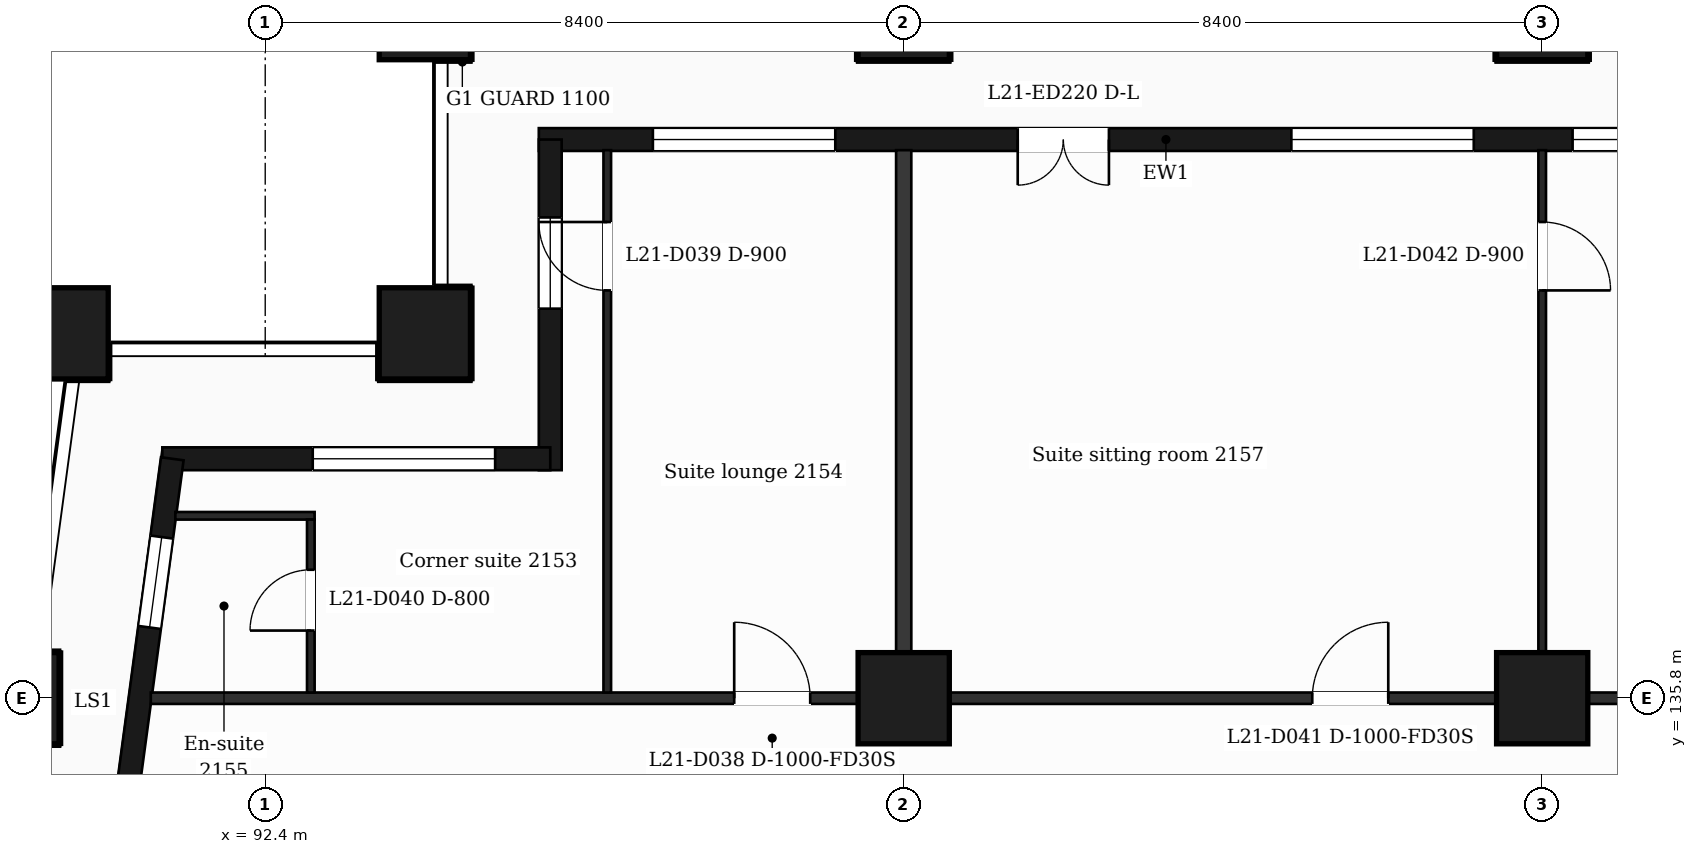
"""IFC4 building model, lengths in metres.
Left out: names, types, materials, properties, quantities, classifications, styles, units other than length and angle.
Written with IfcOpenShell. Run it as: python <this file> out.ifc"""

import sys

from ifc_helpers import new_model, si_unit, direction, frame, frame_2d, origin, origin_2d, place, context, subcontext, project, spatial, rectangle, extrude, element, fill, save


model = new_model("IFC4")
c1 = context("Model", 3, precision=1e-05, world=origin(), true_north=direction((0.0, 1.0)))
c2 = subcontext(c1, "Body", "Model", "MODEL_VIEW")
j1 = project(units=[si_unit("LENGTHUNIT", "METRE"), si_unit("PLANEANGLEUNIT", "RADIAN")], contexts=[c1])
p1 = place(None, origin())
s1 = spatial("IfcSite", under=j1, at=p1, CompositionType="ELEMENT")
p2 = place(p1, origin())
s2 = spatial("IfcBuilding", under=s1, at=p2, CompositionType="ELEMENT")
p3 = place(p2, frame((0.0, 0.0, 94.7)))
s3 = spatial("IfcBuildingStorey", under=s2, at=p3, CompositionType="ELEMENT", Elevation=94.7)
for number, where, z_axis, x_axis in (
    (1, (94.5, 140.6, 0.0), (0.0, 0.0, 1.0), (1.0, 0.0, 0.0)),
    (2, (89.735, 140.6, 0.0), (0.0, 0.0, 1.0), (1.0, 0.0, 0.0)),
    (3, (100.8, 135.8, 0.0), (0.0, 0.0, 1.0), (1.0, 0.0, 0.0)),
    (4, (109.2, 135.8, 0.0), (0.0, 0.0, 1.0), (1.0, 0.0, 0.0)),
    (5, (89.088, 135.8, 0.0), (0.0, 0.0, 1.0), (1.0, 0.0, 0.0)),
    (6, (100.8, 144.8, 0.0), (0.0, 0.0, 1.0), (1.0, 0.0, 0.0)),
    (7, (109.2, 144.8, 0.0), (0.0, 0.0, 1.0), (1.0, 0.0, 0.0)),
    (8, (94.5, 144.8, 0.0), (0.0, 0.0, 1.0), (1.0, 0.0, 0.0)),
):
    element("IfcColumn", number, at=place(p3, frame(where, z_axis=z_axis, x_axis=x_axis)), inside=s3, PredefinedType="COLUMN", context=c2, shape_type="SweptSolid", body=[
        extrude(rectangle(XDim=1.2, YDim=1.2, at=origin_2d()), origin(), (0.0, 0.0, 1.0), 3.7),
    ])
p4 = place(p3, frame((112.5, 143.15, 0.0), z_axis=(0.0, 0.0, 1.0), x_axis=(-1.0, 0.0, 0.0)))
e9 = element("IfcWall", 9, at=p4, inside=s3, PredefinedType="SOLIDWALL", context=c2, shape_type="SweptSolid", body=[
    extrude(rectangle(XDim=16.5, YDim=0.3, at=frame_2d((8.25, 0.0))), origin(), (0.0, 0.0, 1.0), 3.38),
])
p5 = place(p4, frame((0.5, 0.0, 0.9)))
e10 = element("IfcOpeningElement", 10, at=p5, cuts=e9, PredefinedType="OPENING", context=c2, shape_type="SweptSolid", body=[
    extrude(rectangle(XDim=2.4, YDim=2.1, at=frame_2d((1.2, 1.05))), frame((0.0, 0.16, 0.0), z_axis=(0.0, -1.0, 0.0), x_axis=(1.0, 0.0, 0.0)), (0.0, 0.0, 1.0), 0.32),
])
p6 = place(p4, frame((4.2, 0.0, 0.9)))
e11 = element("IfcOpeningElement", 11, at=p6, cuts=e9, PredefinedType="OPENING", context=c2, shape_type="SweptSolid", body=[
    extrude(rectangle(XDim=2.4, YDim=2.1, at=frame_2d((1.2, 1.05))), frame((0.0, 0.16, 0.0), z_axis=(0.0, -1.0, 0.0), x_axis=(1.0, 0.0, 0.0)), (0.0, 0.0, 1.0), 0.32),
])
p7 = place(p4, frame((9.0, 0.0, 0.0)))
e12 = element("IfcOpeningElement", 12, at=p7, cuts=e9, PredefinedType="OPENING", context=c2, shape_type="SweptSolid", body=[
    extrude(rectangle(XDim=1.2, YDim=2.4, at=frame_2d((0.6, 1.2))), frame((0.0, 0.16, 0.0), z_axis=(0.0, -1.0, 0.0), x_axis=(1.0, 0.0, 0.0)), (0.0, 0.0, 1.0), 0.32),
])
p8 = place(p4, frame((12.6, 0.0, 0.9)))
e13 = element("IfcOpeningElement", 13, at=p8, cuts=e9, PredefinedType="OPENING", context=c2, shape_type="SweptSolid", body=[
    extrude(rectangle(XDim=2.4, YDim=2.1, at=frame_2d((1.2, 1.05))), frame((0.0, 0.16, 0.0), z_axis=(0.0, -1.0, 0.0), x_axis=(1.0, 0.0, 0.0)), (0.0, 0.0, 1.0), 0.32),
])
p9 = place(p3, frame((96.15, 143.15, 0.0), z_axis=(0.0, 0.0, 1.0), x_axis=(0.0, -1.0, 0.0)))
e14 = element("IfcWall", 14, at=p9, inside=s3, PredefinedType="SOLIDWALL", context=c2, shape_type="SweptSolid", body=[
    extrude(rectangle(XDim=4.35, YDim=0.3, at=frame_2d((2.175, 0.0))), origin(), (0.0, 0.0, 1.0), 3.38),
])
p10 = place(p9, frame((1.025, 0.0, 0.9)))
e15 = element("IfcOpeningElement", 15, at=p10, cuts=e14, PredefinedType="OPENING", context=c2, shape_type="SweptSolid", body=[
    extrude(rectangle(XDim=1.2, YDim=2.1, at=frame_2d((0.6, 1.05))), frame((0.0, 0.16, 0.0), z_axis=(0.0, -1.0, 0.0), x_axis=(1.0, 0.0, 0.0)), (0.0, 0.0, 1.0), 0.32),
])
p11 = place(p3, frame((96.15, 138.95, 0.0), z_axis=(0.0, 0.0, 1.0), x_axis=(-1.0, 0.0, 0.0)))
e16 = element("IfcWall", 16, at=p11, inside=s3, PredefinedType="SOLIDWALL", context=c2, shape_type="SweptSolid", body=[
    extrude(rectangle(XDim=5.104, YDim=0.3, at=frame_2d((2.552, 0.0))), origin(), (0.0, 0.0, 1.0), 3.38),
])
p12 = place(p11, frame((0.725, 0.0, 0.9)))
e17 = element("IfcOpeningElement", 17, at=p12, cuts=e16, PredefinedType="OPENING", context=c2, shape_type="SweptSolid", body=[
    extrude(rectangle(XDim=2.4, YDim=2.1, at=frame_2d((1.2, 1.05))), frame((0.0, 0.16, 0.0), z_axis=(0.0, -1.0, 0.0), x_axis=(1.0, 0.0, 0.0)), (0.0, 0.0, 1.0), 0.32),
])
p13 = place(p3, frame((91.177, 138.95, 0.0), z_axis=(0.0, 0.0, 1.0), x_axis=(-0.133426664613, -0.991058689065, 0.0)))
e18 = element("IfcWall", 18, at=p13, inside=s3, PredefinedType="SOLIDWALL", context=c2, shape_type="SweptSolid", body=[
    extrude(rectangle(XDim=6.609, YDim=0.3, at=frame_2d((3.305, 0.0))), origin(), (0.0, 0.0, 1.0), 3.38),
])
p14 = place(p13, frame((1.039, 0.0, 0.9)))
e19 = element("IfcOpeningElement", 19, at=p14, cuts=e18, PredefinedType="OPENING", context=c2, shape_type="SweptSolid", body=[
    extrude(rectangle(XDim=1.2, YDim=2.1, at=frame_2d((0.6, 1.05))), frame((0.0, 0.16, 0.0), z_axis=(0.0, -1.0, 0.0), x_axis=(1.0, 0.0, 0.0)), (0.0, 0.0, 1.0), 0.32),
])
p15 = place(p13, frame((4.294, 0.0, 0.0)))
e20 = element("IfcOpeningElement", 20, at=p15, cuts=e18, PredefinedType="OPENING", context=c2, shape_type="SweptSolid", body=[
    extrude(rectangle(XDim=1.2, YDim=2.4, at=frame_2d((0.6, 1.2))), frame((0.0, 0.16, 0.0), z_axis=(0.0, -1.0, 0.0), x_axis=(1.0, 0.0, 0.0)), (0.0, 0.0, 1.0), 0.32),
])
p16 = place(p3, frame((90.895, 135.8, 0.0), z_axis=(0.0, 0.0, 1.0), x_axis=(1.0, 0.0, 0.0)))
e21 = element("IfcWall", 21, at=p16, inside=s3, PredefinedType="PARTITIONING", context=c2, shape_type="SweptSolid", body=[
    extrude(rectangle(XDim=45.011, YDim=0.15, at=frame_2d((22.505, 0.0))), origin(), (0.0, 0.0, 1.0), 3.38),
])
p17 = place(p16, frame((7.675, 0.0, 0.0)))
e22 = element("IfcOpeningElement", 22, at=p17, cuts=e21, PredefinedType="OPENING", context=c2, shape_type="SweptSolid", body=[
    extrude(rectangle(XDim=1.0, YDim=2.1, at=frame_2d((0.5, 1.05))), frame((0.0, 0.085, 0.0), z_axis=(0.0, -1.0, 0.0), x_axis=(1.0, 0.0, 0.0)), (0.0, 0.0, 1.0), 0.17),
])
p18 = place(p16, frame((15.281, 0.0, 0.0)))
e23 = element("IfcOpeningElement", 23, at=p18, cuts=e21, PredefinedType="OPENING", context=c2, shape_type="SweptSolid", body=[
    extrude(rectangle(XDim=1.0, YDim=2.1, at=frame_2d((0.5, 1.05))), frame((0.0, 0.085, 0.0), z_axis=(0.0, -1.0, 0.0), x_axis=(1.0, 0.0, 0.0)), (0.0, 0.0, 1.0), 0.17),
])
p19 = place(p16, frame((29.735, 0.0, 0.0)))
e24 = element("IfcOpeningElement", 24, at=p19, cuts=e21, PredefinedType="OPENING", context=c2, shape_type="SweptSolid", body=[
    extrude(rectangle(XDim=1.0, YDim=2.1, at=frame_2d((0.5, 1.05))), frame((0.0, 0.085, 0.0), z_axis=(0.0, -1.0, 0.0), x_axis=(1.0, 0.0, 0.0)), (0.0, 0.0, 1.0), 0.17),
])
p20 = place(p16, frame((36.005, 0.0, 0.0)))
e25 = element("IfcOpeningElement", 25, at=p20, cuts=e21, PredefinedType="OPENING", context=c2, shape_type="SweptSolid", body=[
    extrude(rectangle(XDim=1.0, YDim=2.1, at=frame_2d((0.5, 1.05))), frame((0.0, 0.085, 0.0), z_axis=(0.0, -1.0, 0.0), x_axis=(1.0, 0.0, 0.0)), (0.0, 0.0, 1.0), 0.17),
])
p21 = place(p3, frame((91.218, 138.2, 0.0), z_axis=(0.0, 0.0, 1.0), x_axis=(1.0, 0.0, 0.0)))
e26 = element("IfcWall", 26, at=p21, inside=s3, PredefinedType="PARTITIONING", context=c2, shape_type="SweptSolid", body=[
    extrude(rectangle(XDim=1.832, YDim=0.1, at=frame_2d((0.916, 0.0))), origin(), (0.0, 0.0, 1.0), 3.38),
])
p22 = place(p3, frame((93.0, 135.875, 0.0), z_axis=(0.0, 0.0, 1.0), x_axis=(0.0, 1.0, 0.0)))
e27 = element("IfcWall", 27, at=p22, inside=s3, PredefinedType="PARTITIONING", context=c2, shape_type="SweptSolid", body=[
    extrude(rectangle(XDim=2.275, YDim=0.1, at=frame_2d((1.137, 0.0))), origin(), (0.0, 0.0, 1.0), 3.38),
])
p23 = place(p22, frame((0.815, 0.0, 0.0)))
e28 = element("IfcOpeningElement", 28, at=p23, cuts=e27, PredefinedType="OPENING", context=c2, shape_type="SweptSolid", body=[
    extrude(rectangle(XDim=0.8, YDim=2.1, at=frame_2d((0.4, 1.05))), frame((0.0, 0.06, 0.0), z_axis=(0.0, -1.0, 0.0), x_axis=(1.0, 0.0, 0.0)), (0.0, 0.0, 1.0), 0.12),
])
p24 = place(p3, frame((96.9, 135.875, 0.0), z_axis=(0.0, 0.0, 1.0), x_axis=(0.0, 1.0, 0.0)))
e29 = element("IfcWall", 29, at=p24, inside=s3, PredefinedType="PARTITIONING", context=c2, shape_type="SweptSolid", body=[
    extrude(rectangle(XDim=7.135, YDim=0.1, at=frame_2d((3.567, 0.0))), origin(), (0.0, 0.0, 1.0), 3.38),
])
p25 = place(p24, frame((5.29, 0.0, 0.0)))
e30 = element("IfcOpeningElement", 30, at=p25, cuts=e29, PredefinedType="OPENING", context=c2, shape_type="SweptSolid", body=[
    extrude(rectangle(XDim=0.9, YDim=2.1, at=frame_2d((0.45, 1.05))), frame((0.0, 0.06, 0.0), z_axis=(0.0, -1.0, 0.0), x_axis=(1.0, 0.0, 0.0)), (0.0, 0.0, 1.0), 0.12),
])
p26 = place(p3, frame((100.8, 135.875, 0.0), z_axis=(0.0, 0.0, 1.0), x_axis=(0.0, 1.0, 0.0)))
e31 = element("IfcWall", 31, at=p26, inside=s3, PredefinedType="PARTITIONING", context=c2, shape_type="SweptSolid", body=[
    extrude(rectangle(XDim=7.135, YDim=0.2, at=frame_2d((3.567, 0.0))), origin(), (0.0, 0.0, 1.0), 3.38),
])
p27 = place(p3, frame((109.2, 135.875, 0.0), z_axis=(0.0, 0.0, 1.0), x_axis=(0.0, 1.0, 0.0)))
e32 = element("IfcWall", 32, at=p27, inside=s3, PredefinedType="PARTITIONING", context=c2, shape_type="SweptSolid", body=[
    extrude(rectangle(XDim=7.135, YDim=0.1, at=frame_2d((3.567, 0.0))), origin(), (0.0, 0.0, 1.0), 3.38),
])
p28 = place(p27, frame((5.29, 0.0, 0.0)))
e33 = element("IfcOpeningElement", 33, at=p28, cuts=e32, PredefinedType="OPENING", context=c2, shape_type="SweptSolid", body=[
    extrude(rectangle(XDim=0.9, YDim=2.1, at=frame_2d((0.45, 1.05))), frame((0.0, 0.06, 0.0), z_axis=(0.0, -1.0, 0.0), x_axis=(1.0, 0.0, 0.0)), (0.0, 0.0, 1.0), 0.12),
])
p29 = place(p5, origin())
e34 = element("IfcWindow", 34, at=p29, inside=s3, PartitioningType="SINGLE_PANEL", PredefinedType="WINDOW", context=c2, shape_type="SweptSolid", body=[
    extrude(rectangle(XDim=2.4, YDim=2.1, at=frame_2d((1.2, 1.05))), frame((0.0, 0.03, 0.0), z_axis=(0.0, -1.0, 0.0), x_axis=(1.0, 0.0, 0.0)), (0.0, 0.0, 1.0), 0.06),
])
fill(e10, e34)
p30 = place(p6, origin())
e35 = element("IfcWindow", 35, at=p30, inside=s3, PartitioningType="SINGLE_PANEL", PredefinedType="WINDOW", context=c2, shape_type="SweptSolid", body=[
    extrude(rectangle(XDim=2.4, YDim=2.1, at=frame_2d((1.2, 1.05))), frame((0.0, 0.03, 0.0), z_axis=(0.0, -1.0, 0.0), x_axis=(1.0, 0.0, 0.0)), (0.0, 0.0, 1.0), 0.06),
])
fill(e11, e35)
p31 = place(p7, origin())
e36 = element("IfcDoor", 36, at=p31, inside=s3, OperationType="DOUBLE_DOOR_SINGLE_SWING", PredefinedType="DOOR", context=c2, shape_type="SweptSolid", body=[
    extrude(rectangle(XDim=1.2, YDim=2.4, at=frame_2d((0.6, 1.2))), frame((0.0, 0.025, 0.0), z_axis=(0.0, -1.0, 0.0), x_axis=(1.0, 0.0, 0.0)), (0.0, 0.0, 1.0), 0.05),
])
fill(e12, e36)
p32 = place(p8, origin())
e37 = element("IfcWindow", 37, at=p32, inside=s3, PartitioningType="SINGLE_PANEL", PredefinedType="WINDOW", context=c2, shape_type="SweptSolid", body=[
    extrude(rectangle(XDim=2.4, YDim=2.1, at=frame_2d((1.2, 1.05))), frame((0.0, 0.03, 0.0), z_axis=(0.0, -1.0, 0.0), x_axis=(1.0, 0.0, 0.0)), (0.0, 0.0, 1.0), 0.06),
])
fill(e13, e37)
p33 = place(p10, origin())
e38 = element("IfcWindow", 38, at=p33, inside=s3, PartitioningType="SINGLE_PANEL", PredefinedType="WINDOW", context=c2, shape_type="SweptSolid", body=[
    extrude(rectangle(XDim=1.2, YDim=2.1, at=frame_2d((0.6, 1.05))), frame((0.0, 0.03, 0.0), z_axis=(0.0, -1.0, 0.0), x_axis=(1.0, 0.0, 0.0)), (0.0, 0.0, 1.0), 0.06),
])
fill(e15, e38)
p34 = place(p12, origin())
e39 = element("IfcWindow", 39, at=p34, inside=s3, PartitioningType="SINGLE_PANEL", PredefinedType="WINDOW", context=c2, shape_type="SweptSolid", body=[
    extrude(rectangle(XDim=2.4, YDim=2.1, at=frame_2d((1.2, 1.05))), frame((0.0, 0.03, 0.0), z_axis=(0.0, -1.0, 0.0), x_axis=(1.0, 0.0, 0.0)), (0.0, 0.0, 1.0), 0.06),
])
fill(e17, e39)
p35 = place(p14, origin())
e40 = element("IfcWindow", 40, at=p35, inside=s3, PartitioningType="SINGLE_PANEL", PredefinedType="WINDOW", context=c2, shape_type="SweptSolid", body=[
    extrude(rectangle(XDim=1.2, YDim=2.1, at=frame_2d((0.6, 1.05))), frame((0.0, 0.03, 0.0), z_axis=(0.0, -1.0, 0.0), x_axis=(1.0, 0.0, 0.0)), (0.0, 0.0, 1.0), 0.06),
])
fill(e19, e40)
p36 = place(p17, origin())
e41 = element("IfcDoor", 41, at=p36, inside=s3, OperationType="SINGLE_SWING_LEFT", PredefinedType="DOOR", context=c2, shape_type="SweptSolid", body=[
    extrude(rectangle(XDim=1.0, YDim=2.1, at=frame_2d((0.5, 1.05))), frame((0.0, 0.025, 0.0), z_axis=(0.0, -1.0, 0.0), x_axis=(1.0, 0.0, 0.0)), (0.0, 0.0, 1.0), 0.05),
])
fill(e22, e41)
p37 = place(p25, origin())
e42 = element("IfcDoor", 42, at=p37, inside=s3, OperationType="SINGLE_SWING_RIGHT", PredefinedType="DOOR", context=c2, shape_type="SweptSolid", body=[
    extrude(rectangle(XDim=0.9, YDim=2.1, at=frame_2d((0.45, 1.05))), frame((0.0, 0.025, 0.0), z_axis=(0.0, -1.0, 0.0), x_axis=(1.0, 0.0, 0.0)), (0.0, 0.0, 1.0), 0.05),
])
fill(e30, e42)
p38 = place(p23, origin())
e43 = element("IfcDoor", 43, at=p38, inside=s3, OperationType="SINGLE_SWING_LEFT", PredefinedType="DOOR", context=c2, shape_type="SweptSolid", body=[
    extrude(rectangle(XDim=0.8, YDim=2.1, at=frame_2d((0.4, 1.05))), frame((0.0, 0.025, 0.0), z_axis=(0.0, -1.0, 0.0), x_axis=(1.0, 0.0, 0.0)), (0.0, 0.0, 1.0), 0.05),
])
fill(e28, e43)
p39 = place(p18, origin())
e44 = element("IfcDoor", 44, at=p39, inside=s3, OperationType="SINGLE_SWING_RIGHT", PredefinedType="DOOR", context=c2, shape_type="SweptSolid", body=[
    extrude(rectangle(XDim=1.0, YDim=2.1, at=frame_2d((0.5, 1.05))), frame((0.0, 0.025, 0.0), z_axis=(0.0, -1.0, 0.0), x_axis=(1.0, 0.0, 0.0)), (0.0, 0.0, 1.0), 0.05),
])
fill(e23, e44)
p40 = place(p28, origin())
e45 = element("IfcDoor", 45, at=p40, inside=s3, OperationType="SINGLE_SWING_LEFT", PredefinedType="DOOR", context=c2, shape_type="SweptSolid", body=[
    extrude(rectangle(XDim=0.9, YDim=2.1, at=frame_2d((0.45, 1.05))), frame((0.0, 0.025, 0.0), z_axis=(0.0, -1.0, 0.0), x_axis=(1.0, 0.0, 0.0)), (0.0, 0.0, 1.0), 0.05),
])
fill(e33, e45)
save(model, sys.argv[1])
